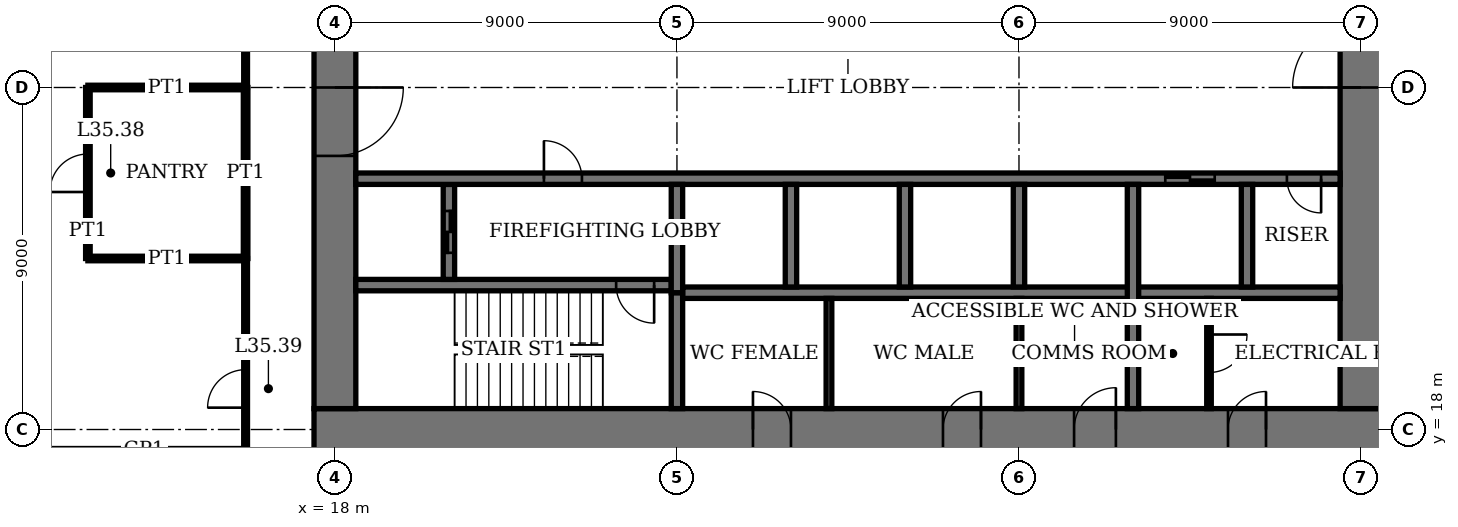
"""IFC4 building model, lengths in metres.
Left out: names, types, materials, properties, quantities, classifications, styles, units other than length and angle.
Written with IfcOpenShell. Run it as: python <this file> out.ifc"""

import sys

from ifc_helpers import new_model, si_unit, direction, frame, frame_2d, origin, place, context, subcontext, project, spatial, rectangle, extrude, element, fill, save


model = new_model("IFC4")
c1 = context("Model", 3, precision=1e-05, world=origin(), true_north=direction((0.0, 1.0)))
c2 = subcontext(c1, "Body", "Model", "MODEL_VIEW")
j1 = project(units=[si_unit("LENGTHUNIT", "METRE"), si_unit("PLANEANGLEUNIT", "RADIAN")], contexts=[c1])
p1 = place(None, origin())
s1 = spatial("IfcSite", under=j1, at=p1, CompositionType="ELEMENT")
p2 = place(p1, origin())
s2 = spatial("IfcBuilding", under=s1, at=p2, CompositionType="ELEMENT")
p3 = place(p2, frame((0.0, 0.0, 145.0)))
s3 = spatial("IfcBuildingStorey", under=s2, at=p3, CompositionType="ELEMENT", Elevation=145.0)
p4 = place(p3, frame((17.45, 18.0, 0.0), z_axis=(0.0, 0.0, 1.0), x_axis=(1.0, 0.0, 0.0)))
e1 = element("IfcWall", 1, at=p4, inside=s3, PredefinedType="SHEAR", context=c2, shape_type="SweptSolid", body=[
    extrude(rectangle(XDim=28.1, YDim=1.1, at=frame_2d((14.05, 0.0))), origin(), (0.0, 0.0, 1.0), 4.0),
])
p5 = place(p4, frame((11.55, 0.0, 0.0)))
e2 = element("IfcOpeningElement", 2, at=p5, cuts=e1, PredefinedType="OPENING", context=c2, shape_type="SweptSolid", body=[
    extrude(rectangle(XDim=1.0, YDim=2.4, at=frame_2d((0.5, 1.2))), frame((0.0, 0.56, 0.0), z_axis=(0.0, -1.0, 0.0), x_axis=(1.0, 0.0, 0.0)), (0.0, 0.0, 1.0), 1.12),
])
p6 = place(p4, frame((16.55, 0.0, 0.0)))
e3 = element("IfcOpeningElement", 3, at=p6, cuts=e1, PredefinedType="OPENING", context=c2, shape_type="SweptSolid", body=[
    extrude(rectangle(XDim=1.0, YDim=2.4, at=frame_2d((0.5, 1.2))), frame((0.0, 0.56, 0.0), z_axis=(0.0, -1.0, 0.0), x_axis=(1.0, 0.0, 0.0)), (0.0, 0.0, 1.0), 1.12),
])
p7 = place(p4, frame((20.0, 0.0, 0.0)))
e4 = element("IfcOpeningElement", 4, at=p7, cuts=e1, PredefinedType="OPENING", context=c2, shape_type="SweptSolid", body=[
    extrude(rectangle(XDim=1.1, YDim=2.4, at=frame_2d((0.55, 1.2))), frame((0.0, 0.56, 0.0), z_axis=(0.0, -1.0, 0.0), x_axis=(1.0, 0.0, 0.0)), (0.0, 0.0, 1.0), 1.12),
])
p8 = place(p4, frame((24.05, 0.0, 0.0)))
e5 = element("IfcOpeningElement", 5, at=p8, cuts=e1, PredefinedType="OPENING", context=c2, shape_type="SweptSolid", body=[
    extrude(rectangle(XDim=1.0, YDim=2.4, at=frame_2d((0.5, 1.2))), frame((0.0, 0.56, 0.0), z_axis=(0.0, -1.0, 0.0), x_axis=(1.0, 0.0, 0.0)), (0.0, 0.0, 1.0), 1.12),
])
p9 = place(p3, frame((18.0, 35.45, 0.0), z_axis=(0.0, 0.0, 1.0), x_axis=(0.0, -1.0, 0.0)))
e6 = element("IfcWall", 6, at=p9, inside=s3, PredefinedType="SHEAR", context=c2, shape_type="SweptSolid", body=[
    extrude(rectangle(XDim=16.9, YDim=1.1, at=frame_2d((8.45, 0.0))), origin(), (0.0, 0.0, 1.0), 4.0),
])
p10 = place(p9, frame((8.45, 0.0, 0.0)))
e7 = element("IfcOpeningElement", 7, at=p10, cuts=e6, PredefinedType="OPENING", context=c2, shape_type="SweptSolid", body=[
    extrude(rectangle(XDim=1.8, YDim=2.4, at=frame_2d((0.9, 1.2))), frame((0.0, 0.56, 0.0), z_axis=(0.0, -1.0, 0.0), x_axis=(1.0, 0.0, 0.0)), (0.0, 0.0, 1.0), 1.12),
])
p11 = place(p3, frame((45.0, 18.55, 0.0), z_axis=(0.0, 0.0, 1.0), x_axis=(0.0, 1.0, 0.0)))
e8 = element("IfcWall", 8, at=p11, inside=s3, PredefinedType="SHEAR", context=c2, shape_type="SweptSolid", body=[
    extrude(rectangle(XDim=16.9, YDim=1.1, at=frame_2d((8.45, 0.0))), origin(), (0.0, 0.0, 1.0), 4.0),
])
p12 = place(p11, frame((8.45, 0.0, 0.0)))
e9 = element("IfcOpeningElement", 9, at=p12, cuts=e8, PredefinedType="OPENING", context=c2, shape_type="SweptSolid", body=[
    extrude(rectangle(XDim=1.8, YDim=2.4, at=frame_2d((0.9, 1.2))), frame((0.0, 0.56, 0.0), z_axis=(0.0, -1.0, 0.0), x_axis=(1.0, 0.0, 0.0)), (0.0, 0.0, 1.0), 1.12),
])
p13 = place(p3, frame((18.55, 21.8, 0.0), z_axis=(0.0, 0.0, 1.0), x_axis=(1.0, 0.0, 0.0)))
e10 = element("IfcWall", 10, at=p13, inside=s3, PredefinedType="SHEAR", context=c2, shape_type="SweptSolid", body=[
    extrude(rectangle(XDim=8.3, YDim=0.3, at=frame_2d((4.15, 0.0))), origin(), (0.0, 0.0, 1.0), 4.0),
])
p14 = place(p13, frame((6.85, 0.0, 0.0)))
e11 = element("IfcOpeningElement", 11, at=p14, cuts=e10, PredefinedType="OPENING", context=c2, shape_type="SweptSolid", body=[
    extrude(rectangle(XDim=1.0, YDim=2.4, at=frame_2d((0.5, 1.2))), frame((0.0, 0.16, 0.0), z_axis=(0.0, -1.0, 0.0), x_axis=(1.0, 0.0, 0.0)), (0.0, 0.0, 1.0), 0.32),
])
p15 = place(p3, frame((27.0, 18.55, 0.0), z_axis=(0.0, 0.0, 1.0), x_axis=(0.0, 1.0, 0.0)))
e12 = element("IfcWall", 12, at=p15, inside=s3, PredefinedType="SHEAR", context=c2, shape_type="SweptSolid", body=[
    extrude(rectangle(XDim=3.05, YDim=0.3, at=frame_2d((1.525, 0.0))), origin(), (0.0, 0.0, 1.0), 4.0),
])
p16 = place(p3, frame((21.0, 21.95, 0.0), z_axis=(0.0, 0.0, 1.0), x_axis=(0.0, 1.0, 0.0)))
e13 = element("IfcWall", 13, at=p16, inside=s3, PredefinedType="SHEAR", context=c2, shape_type="SweptSolid", body=[
    extrude(rectangle(XDim=2.5, YDim=0.3, at=frame_2d((1.25, 0.0))), origin(), (0.0, 0.0, 1.0), 4.0),
])
p17 = place(p16, frame((0.7, 0.0, 0.0)))
e14 = element("IfcOpeningElement", 14, at=p17, cuts=e13, PredefinedType="OPENING", context=c2, shape_type="SweptSolid", body=[
    extrude(rectangle(XDim=1.1, YDim=2.4, at=frame_2d((0.55, 1.2))), frame((0.0, 0.16, 0.0), z_axis=(0.0, -1.0, 0.0), x_axis=(1.0, 0.0, 0.0)), (0.0, 0.0, 1.0), 0.32),
])
p18 = place(p3, frame((18.55, 24.6, 0.0), z_axis=(0.0, 0.0, 1.0), x_axis=(1.0, 0.0, 0.0)))
e15 = element("IfcWall", 15, at=p18, inside=s3, PredefinedType="SHEAR", context=c2, shape_type="SweptSolid", body=[
    extrude(rectangle(XDim=25.9, YDim=0.3, at=frame_2d((12.95, 0.0))), origin(), (0.0, 0.0, 1.0), 4.0),
])
p19 = place(p18, frame((4.95, 0.0, 0.0)))
e16 = element("IfcOpeningElement", 16, at=p19, cuts=e15, PredefinedType="OPENING", context=c2, shape_type="SweptSolid", body=[
    extrude(rectangle(XDim=1.0, YDim=2.4, at=frame_2d((0.5, 1.2))), frame((0.0, 0.16, 0.0), z_axis=(0.0, -1.0, 0.0), x_axis=(1.0, 0.0, 0.0)), (0.0, 0.0, 1.0), 0.32),
])
p20 = place(p18, frame((24.5, 0.0, 0.0)))
e17 = element("IfcOpeningElement", 17, at=p20, cuts=e15, PredefinedType="OPENING", context=c2, shape_type="SweptSolid", body=[
    extrude(rectangle(XDim=0.9, YDim=2.1, at=frame_2d((0.45, 1.05))), frame((0.0, 0.16, 0.0), z_axis=(0.0, -1.0, 0.0), x_axis=(1.0, 0.0, 0.0)), (0.0, 0.0, 1.0), 0.32),
])
p21 = place(p18, frame((21.3, 0.0, 0.0)))
e18 = element("IfcOpeningElement", 18, at=p21, cuts=e15, PredefinedType="OPENING", context=c2, shape_type="SweptSolid", body=[
    extrude(rectangle(XDim=1.3, YDim=2.4, at=frame_2d((0.65, 1.2))), frame((0.0, 0.16, 0.0), z_axis=(0.0, -1.0, 0.0), x_axis=(1.0, 0.0, 0.0)), (0.0, 0.0, 1.0), 0.32),
])
p22 = place(p3, frame((27.15, 21.6, 0.0), z_axis=(0.0, 0.0, 1.0), x_axis=(1.0, 0.0, 0.0)))
e19 = element("IfcWall", 19, at=p22, inside=s3, PredefinedType="SHEAR", context=c2, shape_type="SweptSolid", body=[
    extrude(rectangle(XDim=17.3, YDim=0.3, at=frame_2d((8.65, 0.0))), origin(), (0.0, 0.0, 1.0), 4.0),
])
for number, where, z_axis, x_axis in (
    (20, (30.0, 21.75, 0.0), (0.0, 0.0, 1.0), (0.0, 1.0, 0.0)),
    (21, (33.0, 21.75, 0.0), (0.0, 0.0, 1.0), (0.0, 1.0, 0.0)),
    (22, (36.0, 21.75, 0.0), (0.0, 0.0, 1.0), (0.0, 1.0, 0.0)),
):
    element("IfcWall", number, at=place(p3, frame(where, z_axis=z_axis, x_axis=x_axis)), inside=s3, PredefinedType="SHEAR", context=c2, shape_type="SweptSolid", body=[
        extrude(rectangle(XDim=2.7, YDim=0.3, at=frame_2d((1.35, 0.0))), origin(), (0.0, 0.0, 1.0), 4.0),
    ])
p23 = place(p3, frame((39.0, 18.55, 0.0), z_axis=(0.0, 0.0, 1.0), x_axis=(0.0, 1.0, 0.0)))
e23 = element("IfcWall", 23, at=p23, inside=s3, PredefinedType="SHEAR", context=c2, shape_type="SweptSolid", body=[
    extrude(rectangle(XDim=5.9, YDim=0.3, at=frame_2d((2.95, 0.0))), origin(), (0.0, 0.0, 1.0), 4.0),
])
p24 = place(p3, frame((42.0, 21.75, 0.0), z_axis=(0.0, 0.0, 1.0), x_axis=(0.0, 1.0, 0.0)))
e24 = element("IfcWall", 24, at=p24, inside=s3, PredefinedType="SHEAR", context=c2, shape_type="SweptSolid", body=[
    extrude(rectangle(XDim=2.7, YDim=0.3, at=frame_2d((1.35, 0.0))), origin(), (0.0, 0.0, 1.0), 4.0),
])
p25 = place(p3, frame((27.0, 21.6, 0.0), z_axis=(0.0, 0.0, 1.0), x_axis=(0.0, 1.0, 0.0)))
e25 = element("IfcWall", 25, at=p25, inside=s3, PredefinedType="SHEAR", context=c2, shape_type="SweptSolid", body=[
    extrude(rectangle(XDim=2.85, YDim=0.3, at=frame_2d((1.425, 0.0))), origin(), (0.0, 0.0, 1.0), 4.0),
])
p26 = place(p3, frame((11.5, 22.5, 0.0), z_axis=(0.0, 0.0, 1.0), x_axis=(1.0, 0.0, 0.0)))
e26 = element("IfcWall", 26, at=p26, inside=s3, PredefinedType="PARTITIONING", context=c2, shape_type="SweptSolid", body=[
    extrude(rectangle(XDim=4.15, YDim=0.12, at=frame_2d((2.075, 0.0))), origin(), (0.0, 0.0, 1.0), 3.1),
])
p27 = place(p3, frame((11.5, 27.0, 0.0), z_axis=(0.0, 0.0, 1.0), x_axis=(1.0, 0.0, 0.0)))
e27 = element("IfcWall", 27, at=p27, inside=s3, PredefinedType="PARTITIONING", context=c2, shape_type="SweptSolid", body=[
    extrude(rectangle(XDim=4.15, YDim=0.12, at=frame_2d((2.075, 0.0))), origin(), (0.0, 0.0, 1.0), 3.05),
])
p28 = place(p3, frame((11.5, 22.5, 0.0), z_axis=(0.0, 0.0, 1.0), x_axis=(0.0, 1.0, 0.0)))
e28 = element("IfcWall", 28, at=p28, inside=s3, PredefinedType="PARTITIONING", context=c2, shape_type="SweptSolid", body=[
    extrude(rectangle(XDim=4.5, YDim=0.12, at=frame_2d((2.25, 0.0))), origin(), (0.0, 0.0, 1.0), 3.75),
])
p29 = place(p28, frame((1.75, 0.0, 0.0)))
e29 = element("IfcOpeningElement", 29, at=p29, cuts=e28, PredefinedType="OPENING", context=c2, shape_type="SweptSolid", body=[
    extrude(rectangle(XDim=1.0, YDim=2.4, at=frame_2d((0.5, 1.2))), frame((0.0, 0.07, 0.0), z_axis=(0.0, -1.0, 0.0), x_axis=(1.0, 0.0, 0.0)), (0.0, 0.0, 1.0), 0.14),
])
p30 = place(p3, frame((15.65, 22.5, 0.0), z_axis=(0.0, 0.0, 1.0), x_axis=(0.0, 1.0, 0.0)))
e30 = element("IfcWall", 30, at=p30, inside=s3, PredefinedType="PARTITIONING", context=c2, shape_type="SweptSolid", body=[
    extrude(rectangle(XDim=4.5, YDim=0.12, at=frame_2d((2.25, 0.0))), origin(), (0.0, 0.0, 1.0), 3.75),
])
p31 = place(p3, frame((15.65, 15.65, 0.0), z_axis=(0.0, 0.0, 1.0), x_axis=(0.0, 1.0, 0.0)))
e31 = element("IfcWall", 31, at=p31, inside=s3, PredefinedType="PARTITIONING", context=c2, shape_type="SweptSolid", body=[
    extrude(rectangle(XDim=6.85, YDim=0.1, at=frame_2d((3.425, 0.0))), origin(), (0.0, 0.0, 1.0), 3.75),
])
p32 = place(p31, frame((2.925, 0.0, 0.0)))
e32 = element("IfcOpeningElement", 32, at=p32, cuts=e31, PredefinedType="OPENING", context=c2, shape_type="SweptSolid", body=[
    extrude(rectangle(XDim=1.0, YDim=2.4, at=frame_2d((0.5, 1.2))), frame((0.0, 0.06, 0.0), z_axis=(0.0, -1.0, 0.0), x_axis=(1.0, 0.0, 0.0)), (0.0, 0.0, 1.0), 0.12),
])
p33 = place(p3, frame((15.65, 27.0, 0.0), z_axis=(0.0, 0.0, 1.0), x_axis=(0.0, 1.0, 0.0)))
e33 = element("IfcWall", 33, at=p33, inside=s3, PredefinedType="PARTITIONING", context=c2, shape_type="SweptSolid", body=[
    extrude(rectangle(XDim=9.55, YDim=0.1, at=frame_2d((4.775, 0.0))), origin(), (0.0, 0.0, 1.0), 3.75),
])
for number, where, z_axis, x_axis in (
    (34, (31.0, 18.55, 0.0), (0.0, 0.0, 1.0), (0.0, 1.0, 0.0)),
    (35, (36.0, 18.55, 0.0), (0.0, 0.0, 1.0), (0.0, 1.0, 0.0)),
):
    element("IfcWall", number, at=place(p3, frame(where, z_axis=z_axis, x_axis=x_axis)), inside=s3, PredefinedType="PARTITIONING", context=c2, shape_type="SweptSolid", body=[
        extrude(rectangle(XDim=2.9, YDim=0.15, at=frame_2d((1.45, 0.0))), origin(), (0.0, 0.0, 1.0), 3.75),
    ])
p34 = place(p3, frame((41.0, 18.55, 0.0), z_axis=(0.0, 0.0, 1.0), x_axis=(0.0, 1.0, 0.0)))
e36 = element("IfcWall", 36, at=p34, inside=s3, PredefinedType="PARTITIONING", context=c2, shape_type="SweptSolid", body=[
    extrude(rectangle(XDim=2.9, YDim=0.12, at=frame_2d((1.45, 0.0))), origin(), (0.0, 0.0, 1.0), 3.75),
])
p35 = place(p34, frame((0.95, 0.0, 0.0)))
e37 = element("IfcOpeningElement", 37, at=p35, cuts=e36, PredefinedType="OPENING", context=c2, shape_type="SweptSolid", body=[
    extrude(rectangle(XDim=1.0, YDim=2.4, at=frame_2d((0.5, 1.2))), frame((0.0, 0.07, 0.0), z_axis=(0.0, -1.0, 0.0), x_axis=(1.0, 0.0, 0.0)), (0.0, 0.0, 1.0), 0.14),
])
p36 = place(p10, origin())
e38 = element("IfcDoor", 38, at=p36, inside=s3, OperationType="DOUBLE_DOOR_DOUBLE_SWING", PredefinedType="DOOR", context=c2, shape_type="SweptSolid", body=[
    extrude(rectangle(XDim=1.8, YDim=2.4, at=frame_2d((0.9, 1.2))), frame((0.0, 0.03, 0.0), z_axis=(0.0, -1.0, 0.0), x_axis=(1.0, 0.0, 0.0)), (0.0, 0.0, 1.0), 0.06),
    extrude(rectangle(XDim=0.04, YDim=2.4, at=frame_2d((0.02, 1.2))), frame((0.0, 0.55, 0.0), z_axis=(0.0, -1.0, 0.0), x_axis=(1.0, 0.0, 0.0)), (0.0, 0.0, 1.0), 1.1),
    extrude(rectangle(XDim=0.04, YDim=2.4, at=frame_2d((1.78, 1.2))), frame((0.0, 0.55, 0.0), z_axis=(0.0, -1.0, 0.0), x_axis=(1.0, 0.0, 0.0)), (0.0, 0.0, 1.0), 1.1),
    extrude(rectangle(XDim=1.8, YDim=0.04, at=frame_2d((0.9, 2.38))), frame((0.0, 0.55, 0.0), z_axis=(0.0, -1.0, 0.0), x_axis=(1.0, 0.0, 0.0)), (0.0, 0.0, 1.0), 1.1),
])
fill(e7, e38)
p37 = place(p12, origin())
e39 = element("IfcDoor", 39, at=p37, inside=s3, OperationType="DOUBLE_DOOR_DOUBLE_SWING", PredefinedType="DOOR", context=c2, shape_type="SweptSolid", body=[
    extrude(rectangle(XDim=1.8, YDim=2.4, at=frame_2d((0.9, 1.2))), frame((0.0, 0.03, 0.0), z_axis=(0.0, -1.0, 0.0), x_axis=(1.0, 0.0, 0.0)), (0.0, 0.0, 1.0), 0.06),
    extrude(rectangle(XDim=0.04, YDim=2.4, at=frame_2d((0.02, 1.2))), frame((0.0, 0.55, 0.0), z_axis=(0.0, -1.0, 0.0), x_axis=(1.0, 0.0, 0.0)), (0.0, 0.0, 1.0), 1.1),
    extrude(rectangle(XDim=0.04, YDim=2.4, at=frame_2d((1.78, 1.2))), frame((0.0, 0.55, 0.0), z_axis=(0.0, -1.0, 0.0), x_axis=(1.0, 0.0, 0.0)), (0.0, 0.0, 1.0), 1.1),
    extrude(rectangle(XDim=1.8, YDim=0.04, at=frame_2d((0.9, 2.38))), frame((0.0, 0.55, 0.0), z_axis=(0.0, -1.0, 0.0), x_axis=(1.0, 0.0, 0.0)), (0.0, 0.0, 1.0), 1.1),
])
fill(e9, e39)
p38 = place(p5, origin())
e40 = element("IfcDoor", 40, at=p38, inside=s3, OperationType="SINGLE_SWING_RIGHT", PredefinedType="DOOR", context=c2, shape_type="SweptSolid", body=[
    extrude(rectangle(XDim=1.0, YDim=2.4, at=frame_2d((0.5, 1.2))), frame((0.0, 0.025, 0.0), z_axis=(0.0, -1.0, 0.0), x_axis=(1.0, 0.0, 0.0)), (0.0, 0.0, 1.0), 0.05),
    extrude(rectangle(XDim=0.04, YDim=2.4, at=frame_2d((0.02, 1.2))), frame((0.0, 0.4, 0.0), z_axis=(0.0, -1.0, 0.0), x_axis=(1.0, 0.0, 0.0)), (0.0, 0.0, 1.0), 0.8),
    extrude(rectangle(XDim=0.04, YDim=2.4, at=frame_2d((0.98, 1.2))), frame((0.0, 0.4, 0.0), z_axis=(0.0, -1.0, 0.0), x_axis=(1.0, 0.0, 0.0)), (0.0, 0.0, 1.0), 0.8),
    extrude(rectangle(XDim=1.0, YDim=0.04, at=frame_2d((0.5, 2.38))), frame((0.0, 0.4, 0.0), z_axis=(0.0, -1.0, 0.0), x_axis=(1.0, 0.0, 0.0)), (0.0, 0.0, 1.0), 0.8),
])
fill(e2, e40)
p39 = place(p6, origin())
e41 = element("IfcDoor", 41, at=p39, inside=s3, OperationType="SINGLE_SWING_LEFT", PredefinedType="DOOR", context=c2, shape_type="SweptSolid", body=[
    extrude(rectangle(XDim=1.0, YDim=2.4, at=frame_2d((0.5, 1.2))), frame((0.0, 0.025, 0.0), z_axis=(0.0, -1.0, 0.0), x_axis=(1.0, 0.0, 0.0)), (0.0, 0.0, 1.0), 0.05),
    extrude(rectangle(XDim=0.04, YDim=2.4, at=frame_2d((0.02, 1.2))), frame((0.0, 0.4, 0.0), z_axis=(0.0, -1.0, 0.0), x_axis=(1.0, 0.0, 0.0)), (0.0, 0.0, 1.0), 0.8),
    extrude(rectangle(XDim=0.04, YDim=2.4, at=frame_2d((0.98, 1.2))), frame((0.0, 0.4, 0.0), z_axis=(0.0, -1.0, 0.0), x_axis=(1.0, 0.0, 0.0)), (0.0, 0.0, 1.0), 0.8),
    extrude(rectangle(XDim=1.0, YDim=0.04, at=frame_2d((0.5, 2.38))), frame((0.0, 0.4, 0.0), z_axis=(0.0, -1.0, 0.0), x_axis=(1.0, 0.0, 0.0)), (0.0, 0.0, 1.0), 0.8),
])
fill(e3, e41)
p40 = place(p7, origin())
e42 = element("IfcDoor", 42, at=p40, inside=s3, OperationType="SINGLE_SWING_LEFT", PredefinedType="DOOR", context=c2, shape_type="SweptSolid", body=[
    extrude(rectangle(XDim=1.1, YDim=2.4, at=frame_2d((0.55, 1.2))), frame((0.0, 0.025, 0.0), z_axis=(0.0, -1.0, 0.0), x_axis=(1.0, 0.0, 0.0)), (0.0, 0.0, 1.0), 0.05),
    extrude(rectangle(XDim=0.04, YDim=2.4, at=frame_2d((0.02, 1.2))), frame((0.0, 0.44, 0.0), z_axis=(0.0, -1.0, 0.0), x_axis=(1.0, 0.0, 0.0)), (0.0, 0.0, 1.0), 0.88),
    extrude(rectangle(XDim=0.04, YDim=2.4, at=frame_2d((1.08, 1.2))), frame((0.0, 0.44, 0.0), z_axis=(0.0, -1.0, 0.0), x_axis=(1.0, 0.0, 0.0)), (0.0, 0.0, 1.0), 0.88),
    extrude(rectangle(XDim=1.1, YDim=0.04, at=frame_2d((0.55, 2.38))), frame((0.0, 0.44, 0.0), z_axis=(0.0, -1.0, 0.0), x_axis=(1.0, 0.0, 0.0)), (0.0, 0.0, 1.0), 0.88),
])
fill(e4, e42)
p41 = place(p8, origin())
e43 = element("IfcDoor", 43, at=p41, inside=s3, OperationType="SINGLE_SWING_LEFT", PredefinedType="DOOR", context=c2, shape_type="SweptSolid", body=[
    extrude(rectangle(XDim=1.0, YDim=2.4, at=frame_2d((0.5, 1.2))), frame((0.0, 0.025, 0.0), z_axis=(0.0, -1.0, 0.0), x_axis=(1.0, 0.0, 0.0)), (0.0, 0.0, 1.0), 0.05),
    extrude(rectangle(XDim=0.04, YDim=2.4, at=frame_2d((0.02, 1.2))), frame((0.0, 0.4, 0.0), z_axis=(0.0, -1.0, 0.0), x_axis=(1.0, 0.0, 0.0)), (0.0, 0.0, 1.0), 0.8),
    extrude(rectangle(XDim=0.04, YDim=2.4, at=frame_2d((0.98, 1.2))), frame((0.0, 0.4, 0.0), z_axis=(0.0, -1.0, 0.0), x_axis=(1.0, 0.0, 0.0)), (0.0, 0.0, 1.0), 0.8),
    extrude(rectangle(XDim=1.0, YDim=0.04, at=frame_2d((0.5, 2.38))), frame((0.0, 0.4, 0.0), z_axis=(0.0, -1.0, 0.0), x_axis=(1.0, 0.0, 0.0)), (0.0, 0.0, 1.0), 0.8),
])
fill(e5, e43)
p42 = place(p14, origin())
e44 = element("IfcDoor", 44, at=p42, inside=s3, OperationType="SINGLE_SWING_RIGHT", PredefinedType="DOOR", context=c2, shape_type="SweptSolid", body=[
    extrude(rectangle(XDim=1.0, YDim=2.4, at=frame_2d((0.5, 1.2))), frame((0.0, 0.03, 0.0), z_axis=(0.0, -1.0, 0.0), x_axis=(1.0, 0.0, 0.0)), (0.0, 0.0, 1.0), 0.06),
])
fill(e11, e44)
p43 = place(p19, origin())
e45 = element("IfcDoor", 45, at=p43, inside=s3, OperationType="SINGLE_SWING_RIGHT", PredefinedType="DOOR", context=c2, shape_type="SweptSolid", body=[
    extrude(rectangle(XDim=1.0, YDim=2.4, at=frame_2d((0.5, 1.2))), frame((0.0, 0.03, 0.0), z_axis=(0.0, -1.0, 0.0), x_axis=(1.0, 0.0, 0.0)), (0.0, 0.0, 1.0), 0.06),
])
fill(e16, e45)
p44 = place(p20, origin())
e46 = element("IfcDoor", 46, at=p44, inside=s3, OperationType="SINGLE_SWING_RIGHT", PredefinedType="DOOR", context=c2, shape_type="SweptSolid", body=[
    extrude(rectangle(XDim=0.9, YDim=2.1, at=frame_2d((0.45, 1.05))), frame((0.0, 0.03, 0.0), z_axis=(0.0, -1.0, 0.0), x_axis=(1.0, 0.0, 0.0)), (0.0, 0.0, 1.0), 0.06),
])
fill(e17, e46)
p45 = place(p29, origin())
e47 = element("IfcDoor", 47, at=p45, inside=s3, OperationType="SINGLE_SWING_RIGHT", PredefinedType="DOOR", context=c2, shape_type="SweptSolid", body=[
    extrude(rectangle(XDim=1.0, YDim=2.4, at=frame_2d((0.5, 1.2))), frame((0.0, 0.025, 0.0), z_axis=(0.0, -1.0, 0.0), x_axis=(1.0, 0.0, 0.0)), (0.0, 0.0, 1.0), 0.05),
])
fill(e29, e47)
p46 = place(p32, origin())
e48 = element("IfcDoor", 48, at=p46, inside=s3, OperationType="SINGLE_SWING_RIGHT", PredefinedType="DOOR", context=c2, shape_type="SweptSolid", body=[
    extrude(rectangle(XDim=1.0, YDim=2.4, at=frame_2d((0.5, 1.2))), frame((0.0, 0.02, 0.0), z_axis=(0.0, -1.0, 0.0), x_axis=(1.0, 0.0, 0.0)), (0.0, 0.0, 1.0), 0.04),
])
fill(e32, e48)
p47 = place(p35, origin())
e49 = element("IfcDoor", 49, at=p47, inside=s3, OperationType="SINGLE_SWING_RIGHT", PredefinedType="DOOR", context=c2, shape_type="SweptSolid", body=[
    extrude(rectangle(XDim=1.0, YDim=2.4, at=frame_2d((0.5, 1.2))), frame((0.0, 0.03, 0.0), z_axis=(0.0, -1.0, 0.0), x_axis=(1.0, 0.0, 0.0)), (0.0, 0.0, 1.0), 0.06),
])
fill(e37, e49)
p48 = place(p21, origin())
e50 = element("IfcDoor", 50, at=p48, inside=s3, OperationType="DOUBLE_DOOR_SLIDING", PredefinedType="DOOR", context=c2, shape_type="SweptSolid", body=[
    extrude(rectangle(XDim=1.3, YDim=2.4, at=frame_2d((0.65, 1.2))), frame((0.0, 0.02, 0.0), z_axis=(0.0, -1.0, 0.0), x_axis=(1.0, 0.0, 0.0)), (0.0, 0.0, 1.0), 0.04),
])
fill(e18, e50)
p49 = place(p17, origin())
e51 = element("IfcDoor", 51, at=p49, inside=s3, OperationType="DOUBLE_DOOR_SLIDING", PredefinedType="DOOR", context=c2, shape_type="SweptSolid", body=[
    extrude(rectangle(XDim=1.1, YDim=2.4, at=frame_2d((0.55, 1.2))), frame((0.0, 0.03, 0.0), z_axis=(0.0, -1.0, 0.0), x_axis=(1.0, 0.0, 0.0)), (0.0, 0.0, 1.0), 0.06),
])
fill(e14, e51)
save(model, sys.argv[1])
